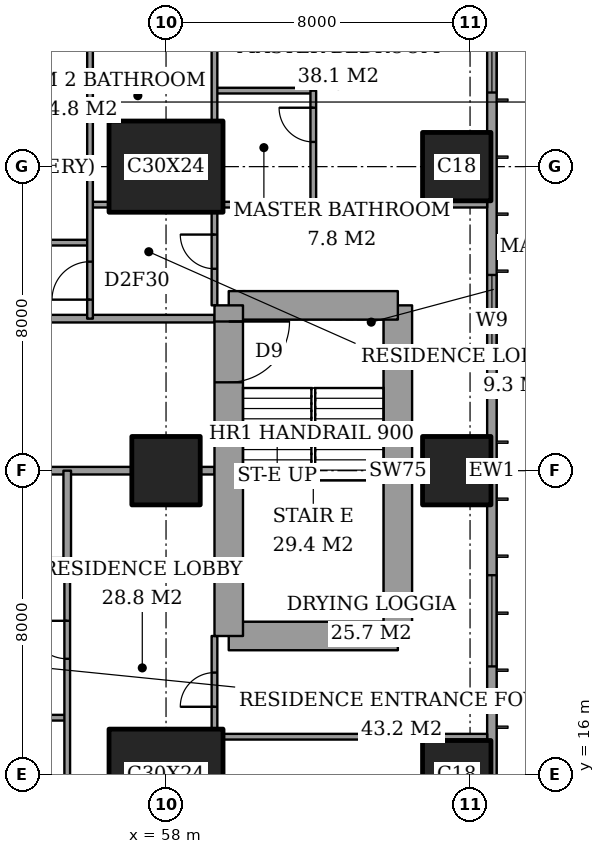
"""IFC4 building model, lengths in metres.
Left out: names, types, materials, properties, quantities, classifications, styles, units other than length and angle.
Written with IfcOpenShell. Run it as: python <this file> out.ifc"""

import sys

from ifc_helpers import new_model, si_unit, direction, frame, frame_2d, origin, origin_2d, place, context, subcontext, project, spatial, rectangle, extrude, element, fill, save


model = new_model("IFC4")
c1 = context("Model", 3, precision=1e-05, world=origin(), true_north=direction((0.0, 1.0)))
c2 = subcontext(c1, "Body", "Model", "MODEL_VIEW")
j1 = project(units=[si_unit("LENGTHUNIT", "METRE"), si_unit("PLANEANGLEUNIT", "RADIAN")], contexts=[c1])
p1 = place(None, origin())
s1 = spatial("IfcSite", under=j1, at=p1, CompositionType="ELEMENT")
p2 = place(p1, origin())
s2 = spatial("IfcBuilding", under=s1, at=p2, CompositionType="ELEMENT")
p3 = place(p2, frame((0.0, 0.0, 221.8)))
s3 = spatial("IfcBuildingStorey", under=s2, at=p3, CompositionType="ELEMENT", Elevation=221.8)
p4 = place(p3, frame((58.0, 16.0, 0.0), z_axis=(0.0, 0.0, 1.0), x_axis=(1.0, 0.0, 0.0)))
e1 = element("IfcColumn", 1, at=p4, inside=s3, PredefinedType="COLUMN", context=c2, shape_type="SweptSolid", body=[
    extrude(rectangle(XDim=3.0, YDim=2.4, at=origin_2d()), origin(), (0.0, 0.0, 1.0), 3.6),
])
p5 = place(p3, frame((58.0, 24.0, 0.0), z_axis=(0.0, 0.0, 1.0), x_axis=(1.0, 0.0, 0.0)))
e2 = element("IfcColumn", 2, at=p5, inside=s3, PredefinedType="COLUMN", context=c2, shape_type="SweptSolid", body=[
    extrude(rectangle(XDim=1.8, YDim=1.8, at=origin_2d()), origin(), (0.0, 0.0, 1.0), 3.6),
])
p6 = place(p3, frame((58.0, 32.0, 0.0), z_axis=(0.0, 0.0, 1.0), x_axis=(1.0, 0.0, 0.0)))
e3 = element("IfcColumn", 3, at=p6, inside=s3, PredefinedType="COLUMN", context=c2, shape_type="SweptSolid", body=[
    extrude(rectangle(XDim=3.0, YDim=2.4, at=origin_2d()), origin(), (0.0, 0.0, 1.0), 3.6),
])
for number, where, z_axis, x_axis in (
    (4, (65.65, 16.0, 0.0), (0.0, 0.0, 1.0), (1.0, 0.0, 0.0)),
    (5, (65.65, 24.0, 0.0), (0.0, 0.0, 1.0), (1.0, 0.0, 0.0)),
    (6, (65.65, 32.0, 0.0), (0.0, 0.0, 1.0), (1.0, 0.0, 0.0)),
):
    element("IfcColumn", number, at=place(p3, frame(where, z_axis=z_axis, x_axis=x_axis)), inside=s3, PredefinedType="COLUMN", context=c2, shape_type="SweptSolid", body=[
        extrude(rectangle(XDim=1.8, YDim=1.8, at=origin_2d()), origin(), (0.0, 0.0, 1.0), 3.6),
    ])
p7 = place(p3, frame((59.65, 19.65, 0.0), z_axis=(0.0, 0.0, 1.0), x_axis=(1.0, 0.0, 0.0)))
e7 = element("IfcWall", 7, at=p7, inside=s3, PredefinedType="SHEAR", context=c2, shape_type="SweptSolid", body=[
    extrude(rectangle(XDim=4.45, YDim=0.75, at=frame_2d((2.225, 0.0))), origin(), (0.0, 0.0, 1.0), 3.6),
])
p8 = place(p3, frame((64.1, 19.65, 0.0), z_axis=(0.0, 0.0, 1.0), x_axis=(0.0, 1.0, 0.0)))
e8 = element("IfcWall", 8, at=p8, inside=s3, PredefinedType="SHEAR", context=c2, shape_type="SweptSolid", body=[
    extrude(rectangle(XDim=8.7, YDim=0.75, at=frame_2d((4.35, 0.0))), origin(), (0.0, 0.0, 1.0), 3.6),
])
p9 = place(p3, frame((64.1, 28.35, 0.0), z_axis=(0.0, 0.0, 1.0), x_axis=(-1.0, 0.0, 0.0)))
e9 = element("IfcWall", 9, at=p9, inside=s3, PredefinedType="SHEAR", context=c2, shape_type="SweptSolid", body=[
    extrude(rectangle(XDim=4.45, YDim=0.75, at=frame_2d((2.225, 0.0))), origin(), (0.0, 0.0, 1.0), 3.6),
])
p10 = place(p3, frame((59.65, 28.35, 0.0), z_axis=(0.0, 0.0, 1.0), x_axis=(0.0, -1.0, 0.0)))
e10 = element("IfcWall", 10, at=p10, inside=s3, PredefinedType="SHEAR", context=c2, shape_type="SweptSolid", body=[
    extrude(rectangle(XDim=8.7, YDim=0.75, at=frame_2d((4.35, 0.0))), origin(), (0.0, 0.0, 1.0), 3.6),
])
p11 = place(p10, frame((0.425, 0.0, 0.0)))
e11 = element("IfcOpeningElement", 11, at=p11, cuts=e10, PredefinedType="OPENING", context=c2, shape_type="SweptSolid", body=[
    extrude(rectangle(XDim=1.6, YDim=2.1, at=frame_2d((0.8, 1.05))), frame((0.0, 0.385, 0.0), z_axis=(0.0, -1.0, 0.0), x_axis=(1.0, 0.0, 0.0)), (0.0, 0.0, 1.0), 0.77),
])
p12 = place(p3, frame((66.575, 3.175, 0.0), z_axis=(0.0, 0.0, 1.0), x_axis=(0.0, 1.0, 0.0)))
e12 = element("IfcWall", 12, at=p12, inside=s3, PredefinedType="SOLIDWALL", context=c2, shape_type="SweptSolid", body=[
    extrude(rectangle(XDim=41.65, YDim=0.25, at=frame_2d((20.825, 0.0))), origin(), (0.0, 0.0, 1.0), 3.6),
])
p13 = place(p12, frame((0.825, 0.0, 0.2)))
e13 = element("IfcOpeningElement", 13, at=p13, cuts=e12, PredefinedType="OPENING", context=c2, shape_type="SweptSolid", body=[
    extrude(rectangle(XDim=2.4, YDim=2.4, at=frame_2d((1.2, 1.2))), frame((0.0, 0.135, 0.0), z_axis=(0.0, -1.0, 0.0), x_axis=(1.0, 0.0, 0.0)), (0.0, 0.0, 1.0), 0.27),
])
p14 = place(p12, frame((6.225, 0.0, 0.2)))
e14 = element("IfcOpeningElement", 14, at=p14, cuts=e12, PredefinedType="OPENING", context=c2, shape_type="SweptSolid", body=[
    extrude(rectangle(XDim=1.2, YDim=2.4, at=frame_2d((0.6, 1.2))), frame((0.0, 0.135, 0.0), z_axis=(0.0, -1.0, 0.0), x_axis=(1.0, 0.0, 0.0)), (0.0, 0.0, 1.0), 0.27),
])
p15 = place(p12, frame((8.675, 0.0, 0.2)))
e15 = element("IfcOpeningElement", 15, at=p15, cuts=e12, PredefinedType="OPENING", context=c2, shape_type="SweptSolid", body=[
    extrude(rectangle(XDim=2.4, YDim=2.4, at=frame_2d((1.2, 1.2))), frame((0.0, 0.135, 0.0), z_axis=(0.0, -1.0, 0.0), x_axis=(1.0, 0.0, 0.0)), (0.0, 0.0, 1.0), 0.27),
])
p16 = place(p12, frame((15.675, 0.0, 0.2)))
e16 = element("IfcOpeningElement", 16, at=p16, cuts=e12, PredefinedType="OPENING", context=c2, shape_type="SweptSolid", body=[
    extrude(rectangle(XDim=2.4, YDim=2.4, at=frame_2d((1.2, 1.2))), frame((0.0, 0.135, 0.0), z_axis=(0.0, -1.0, 0.0), x_axis=(1.0, 0.0, 0.0)), (0.0, 0.0, 1.0), 0.27),
])
p17 = place(p12, frame((23.575, 0.0, 0.2)))
e17 = element("IfcOpeningElement", 17, at=p17, cuts=e12, PredefinedType="OPENING", context=c2, shape_type="SweptSolid", body=[
    extrude(rectangle(XDim=2.4, YDim=2.4, at=frame_2d((1.2, 1.2))), frame((0.0, 0.135, 0.0), z_axis=(0.0, -1.0, 0.0), x_axis=(1.0, 0.0, 0.0)), (0.0, 0.0, 1.0), 0.27),
])
p18 = place(p12, frame((30.775, 0.0, 0.2)))
e18 = element("IfcOpeningElement", 18, at=p18, cuts=e12, PredefinedType="OPENING", context=c2, shape_type="SweptSolid", body=[
    extrude(rectangle(XDim=2.4, YDim=2.4, at=frame_2d((1.2, 1.2))), frame((0.0, 0.135, 0.0), z_axis=(0.0, -1.0, 0.0), x_axis=(1.0, 0.0, 0.0)), (0.0, 0.0, 1.0), 0.27),
])
p19 = place(p12, frame((34.55, 0.0, 0.2)))
e19 = element("IfcOpeningElement", 19, at=p19, cuts=e12, PredefinedType="OPENING", context=c2, shape_type="SweptSolid", body=[
    extrude(rectangle(XDim=1.2, YDim=2.4, at=frame_2d((0.6, 1.2))), frame((0.0, 0.135, 0.0), z_axis=(0.0, -1.0, 0.0), x_axis=(1.0, 0.0, 0.0)), (0.0, 0.0, 1.0), 0.27),
])
p20 = place(p12, frame((38.425, 0.0, 0.2)))
e20 = element("IfcOpeningElement", 20, at=p20, cuts=e12, PredefinedType="OPENING", context=c2, shape_type="SweptSolid", body=[
    extrude(rectangle(XDim=2.4, YDim=2.4, at=frame_2d((1.2, 1.2))), frame((0.0, 0.135, 0.0), z_axis=(0.0, -1.0, 0.0), x_axis=(1.0, 0.0, 0.0)), (0.0, 0.0, 1.0), 0.27),
])
p21 = place(p3, frame((59.5, 17.0, 0.0), z_axis=(0.0, 0.0, 1.0), x_axis=(1.0, 0.0, 0.0)))
e21 = element("IfcWall", 21, at=p21, inside=s3, PredefinedType="PARTITIONING", context=c2, shape_type="SweptSolid", body=[
    extrude(rectangle(XDim=6.95, YDim=0.15, at=frame_2d((3.475, 0.0))), origin(), (0.0, 0.0, 1.0), 3.25),
])
p22 = place(p3, frame((51.6, 17.5, 0.0), z_axis=(0.0, 0.0, 1.0), x_axis=(1.0, 0.0, 0.0)))
e22 = element("IfcWall", 22, at=p22, inside=s3, PredefinedType="PARTITIONING", context=c2, shape_type="SweptSolid", body=[
    extrude(rectangle(XDim=3.8, YDim=0.15, at=frame_2d((1.9, 0.0))), origin(), (0.0, 0.0, 1.0), 3.25),
])
p23 = place(p22, frame((2.2, 0.0, 0.0)))
e23 = element("IfcOpeningElement", 23, at=p23, cuts=e22, PredefinedType="OPENING", context=c2, shape_type="SweptSolid", body=[
    extrude(rectangle(XDim=1.0, YDim=2.1, at=frame_2d((0.5, 1.05))), frame((0.0, 0.085, 0.0), z_axis=(0.0, -1.0, 0.0), x_axis=(1.0, 0.0, 0.0)), (0.0, 0.0, 1.0), 0.17),
])
p24 = place(p3, frame((51.2, 21.6, 0.0), z_axis=(0.0, 0.0, 1.0), x_axis=(1.0, 0.0, 0.0)))
e24 = element("IfcWall", 24, at=p24, inside=s3, PredefinedType="PARTITIONING", context=c2, shape_type="SweptSolid", body=[
    extrude(rectangle(XDim=4.2, YDim=0.2, at=frame_2d((2.1, 0.0))), origin(), (0.0, 0.0, 1.0), 3.25),
])
p25 = place(p24, frame((1.65, 0.0, 0.0)))
e25 = element("IfcOpeningElement", 25, at=p25, cuts=e24, PredefinedType="OPENING", context=c2, shape_type="SweptSolid", body=[
    extrude(rectangle(XDim=0.9, YDim=2.1, at=frame_2d((0.45, 1.05))), frame((0.0, 0.11, 0.0), z_axis=(0.0, -1.0, 0.0), x_axis=(1.0, 0.0, 0.0)), (0.0, 0.0, 1.0), 0.22),
])
p26 = place(p3, frame((50.9, 24.0, 0.0), z_axis=(0.0, 0.0, 1.0), x_axis=(1.0, 0.0, 0.0)))
e26 = element("IfcWall", 26, at=p26, inside=s3, PredefinedType="PARTITIONING", context=c2, shape_type="SweptSolid", body=[
    extrude(rectangle(XDim=6.2, YDim=0.2, at=frame_2d((3.1, 0.0))), origin(), (0.0, 0.0, 1.0), 3.25),
])
p27 = place(p3, frame((58.9, 24.0, 0.0), z_axis=(0.0, 0.0, 1.0), x_axis=(1.0, 0.0, 0.0)))
e27 = element("IfcWall", 27, at=p27, inside=s3, PredefinedType="PARTITIONING", context=c2, shape_type="SweptSolid", body=[
    extrude(rectangle(XDim=0.375, YDim=0.2, at=frame_2d((0.188, 0.0))), origin(), (0.0, 0.0, 1.0), 3.25),
])
p28 = place(p3, frame((42.0, 28.0, 0.0), z_axis=(0.0, 0.0, 1.0), x_axis=(1.0, 0.0, 0.0)))
e28 = element("IfcWall", 28, at=p28, inside=s3, PredefinedType="PARTITIONING", context=c2, shape_type="SweptSolid", body=[
    extrude(rectangle(XDim=17.275, YDim=0.2, at=frame_2d((8.637, 0.0))), origin(), (0.0, 0.0, 1.0), 3.25),
])
p29 = place(p28, frame((9.4, 0.0, 0.0)))
e29 = element("IfcOpeningElement", 29, at=p29, cuts=e28, PredefinedType="OPENING", context=c2, shape_type="SweptSolid", body=[
    extrude(rectangle(XDim=1.2, YDim=2.4, at=frame_2d((0.6, 1.2))), frame((0.0, 0.11, 0.0), z_axis=(0.0, -1.0, 0.0), x_axis=(1.0, 0.0, 0.0)), (0.0, 0.0, 1.0), 0.22),
])
p30 = place(p3, frame((51.6, 30.0, 0.0), z_axis=(0.0, 0.0, 1.0), x_axis=(1.0, 0.0, 0.0)))
e30 = element("IfcWall", 30, at=p30, inside=s3, PredefinedType="PARTITIONING", context=c2, shape_type="SweptSolid", body=[
    extrude(rectangle(XDim=4.4, YDim=0.15, at=frame_2d((2.2, 0.0))), origin(), (0.0, 0.0, 1.0), 3.25),
])
p31 = place(p30, frame((0.6, 0.0, 0.0)))
e31 = element("IfcOpeningElement", 31, at=p31, cuts=e30, PredefinedType="OPENING", context=c2, shape_type="SweptSolid", body=[
    extrude(rectangle(XDim=1.0, YDim=2.1, at=frame_2d((0.5, 1.05))), frame((0.0, 0.085, 0.0), z_axis=(0.0, -1.0, 0.0), x_axis=(1.0, 0.0, 0.0)), (0.0, 0.0, 1.0), 0.17),
])
p32 = place(p3, frame((56.0, 31.0, 0.0), z_axis=(0.0, 0.0, 1.0), x_axis=(1.0, 0.0, 0.0)))
e32 = element("IfcWall", 32, at=p32, inside=s3, PredefinedType="PARTITIONING", context=c2, shape_type="SweptSolid", body=[
    extrude(rectangle(XDim=0.5, YDim=0.15, at=frame_2d((0.25, 0.0))), origin(), (0.0, 0.0, 1.0), 3.25),
])
p33 = place(p3, frame((59.5, 31.0, 0.0), z_axis=(0.0, 0.0, 1.0), x_axis=(1.0, 0.0, 0.0)))
e33 = element("IfcWall", 33, at=p33, inside=s3, PredefinedType="PARTITIONING", context=c2, shape_type="SweptSolid", body=[
    extrude(rectangle(XDim=6.95, YDim=0.15, at=frame_2d((3.475, 0.0))), origin(), (0.0, 0.0, 1.0), 3.25),
])
p34 = place(p3, frame((59.275, 34.0, 0.0), z_axis=(0.0, 0.0, 1.0), x_axis=(1.0, 0.0, 0.0)))
e34 = element("IfcWall", 34, at=p34, inside=s3, PredefinedType="PARTITIONING", context=c2, shape_type="SweptSolid", body=[
    extrude(rectangle(XDim=2.6, YDim=0.15, at=frame_2d((1.3, 0.0))), origin(), (0.0, 0.0, 1.0), 3.25),
])
p35 = place(p3, frame((55.4, 21.6, 0.0), z_axis=(0.0, 0.0, 1.0), x_axis=(0.0, 1.0, 0.0)))
e35 = element("IfcWall", 35, at=p35, inside=s3, PredefinedType="PARTITIONING", context=c2, shape_type="SweptSolid", body=[
    extrude(rectangle(XDim=2.4, YDim=0.2, at=frame_2d((1.2, 0.0))), origin(), (0.0, 0.0, 1.0), 3.25),
])
p36 = place(p3, frame((55.4, 11.0, 0.0), z_axis=(0.0, 0.0, 1.0), x_axis=(0.0, 1.0, 0.0)))
e36 = element("IfcWall", 36, at=p36, inside=s3, PredefinedType="PARTITIONING", context=c2, shape_type="SweptSolid", body=[
    extrude(rectangle(XDim=10.6, YDim=0.15, at=frame_2d((5.3, 0.0))), origin(), (0.0, 0.0, 1.0), 3.25),
])
p37 = place(p36, frame((8.05, 0.0, 0.0)))
e37 = element("IfcOpeningElement", 37, at=p37, cuts=e36, PredefinedType="OPENING", context=c2, shape_type="SweptSolid", body=[
    extrude(rectangle(XDim=1.0, YDim=2.1, at=frame_2d((0.5, 1.05))), frame((0.0, 0.085, 0.0), z_axis=(0.0, -1.0, 0.0), x_axis=(1.0, 0.0, 0.0)), (0.0, 0.0, 1.0), 0.17),
])
p38 = place(p3, frame((56.0, 28.0, 0.0), z_axis=(0.0, 0.0, 1.0), x_axis=(0.0, 1.0, 0.0)))
e38 = element("IfcWall", 38, at=p38, inside=s3, PredefinedType="PARTITIONING", context=c2, shape_type="SweptSolid", body=[
    extrude(rectangle(XDim=9.4, YDim=0.15, at=frame_2d((4.7, 0.0))), origin(), (0.0, 0.0, 1.0), 3.25),
])
p39 = place(p38, frame((0.5, 0.0, 0.0)))
e39 = element("IfcOpeningElement", 39, at=p39, cuts=e38, PredefinedType="OPENING", context=c2, shape_type="SweptSolid", body=[
    extrude(rectangle(XDim=1.0, YDim=2.1, at=frame_2d((0.5, 1.05))), frame((0.0, 0.085, 0.0), z_axis=(0.0, -1.0, 0.0), x_axis=(1.0, 0.0, 0.0)), (0.0, 0.0, 1.0), 0.17),
])
p40 = place(p3, frame((59.275, 17.2, 0.0), z_axis=(0.0, 0.0, 1.0), x_axis=(0.0, 1.0, 0.0)))
e40 = element("IfcWall", 40, at=p40, inside=s3, PredefinedType="PARTITIONING", context=c2, shape_type="SweptSolid", body=[
    extrude(rectangle(XDim=2.45, YDim=0.15, at=frame_2d((1.225, 0.0))), origin(), (0.0, 0.0, 1.0), 3.25),
])
p41 = place(p40, frame((0.587, 0.0, 0.0)))
e41 = element("IfcOpeningElement", 41, at=p41, cuts=e40, PredefinedType="OPENING", context=c2, shape_type="SweptSolid", body=[
    extrude(rectangle(XDim=0.9, YDim=2.1, at=frame_2d((0.45, 1.05))), frame((0.0, 0.085, 0.0), z_axis=(0.0, -1.0, 0.0), x_axis=(1.0, 0.0, 0.0)), (0.0, 0.0, 1.0), 0.17),
])
p42 = place(p3, frame((59.275, 28.35, 0.0), z_axis=(0.0, 0.0, 1.0), x_axis=(0.0, 1.0, 0.0)))
e42 = element("IfcWall", 42, at=p42, inside=s3, PredefinedType="PARTITIONING", context=c2, shape_type="SweptSolid", body=[
    extrude(rectangle(XDim=2.45, YDim=0.15, at=frame_2d((1.225, 0.0))), origin(), (0.0, 0.0, 1.0), 3.25),
])
p43 = place(p42, frame((0.962, 0.0, 0.0)))
e43 = element("IfcOpeningElement", 43, at=p43, cuts=e42, PredefinedType="OPENING", context=c2, shape_type="SweptSolid", body=[
    extrude(rectangle(XDim=0.9, YDim=2.1, at=frame_2d((0.45, 1.05))), frame((0.0, 0.085, 0.0), z_axis=(0.0, -1.0, 0.0), x_axis=(1.0, 0.0, 0.0)), (0.0, 0.0, 1.0), 0.17),
])
p44 = place(p3, frame((59.275, 33.2, 0.0), z_axis=(0.0, 0.0, 1.0), x_axis=(0.0, 1.0, 0.0)))
e44 = element("IfcWall", 44, at=p44, inside=s3, PredefinedType="PARTITIONING", context=c2, shape_type="SweptSolid", body=[
    extrude(rectangle(XDim=4.2, YDim=0.15, at=frame_2d((2.1, 0.0))), origin(), (0.0, 0.0, 1.0), 3.25),
])
p45 = place(p3, frame((61.875, 31.0, 0.0), z_axis=(0.0, 0.0, 1.0), x_axis=(0.0, 1.0, 0.0)))
e45 = element("IfcWall", 45, at=p45, inside=s3, PredefinedType="PARTITIONING", context=c2, shape_type="SweptSolid", body=[
    extrude(rectangle(XDim=3.0, YDim=0.15, at=frame_2d((1.5, 0.0))), origin(), (0.0, 0.0, 1.0), 3.25),
])
p46 = place(p45, frame((1.65, 0.0, 0.0)))
e46 = element("IfcOpeningElement", 46, at=p46, cuts=e45, PredefinedType="OPENING", context=c2, shape_type="SweptSolid", body=[
    extrude(rectangle(XDim=0.9, YDim=2.1, at=frame_2d((0.45, 1.05))), frame((0.0, 0.085, 0.0), z_axis=(0.0, -1.0, 0.0), x_axis=(1.0, 0.0, 0.0)), (0.0, 0.0, 1.0), 0.17),
])
p47 = place(p16, origin())
e47 = element("IfcWindow", 47, at=p47, inside=s3, PartitioningType="SINGLE_PANEL", PredefinedType="WINDOW", context=c2, shape_type="SweptSolid", body=[
    extrude(rectangle(XDim=2.4, YDim=2.4, at=frame_2d((1.2, 1.2))), frame((0.0, 0.03, 0.0), z_axis=(0.0, -1.0, 0.0), x_axis=(1.0, 0.0, 0.0)), (0.0, 0.0, 1.0), 0.06),
])
fill(e16, e47)
p48 = place(p17, origin())
e48 = element("IfcWindow", 48, at=p48, inside=s3, PartitioningType="SINGLE_PANEL", PredefinedType="WINDOW", context=c2, shape_type="SweptSolid", body=[
    extrude(rectangle(XDim=2.4, YDim=2.4, at=frame_2d((1.2, 1.2))), frame((0.0, 0.03, 0.0), z_axis=(0.0, -1.0, 0.0), x_axis=(1.0, 0.0, 0.0)), (0.0, 0.0, 1.0), 0.06),
])
fill(e17, e48)
p49 = place(p18, origin())
e49 = element("IfcWindow", 49, at=p49, inside=s3, PartitioningType="SINGLE_PANEL", PredefinedType="WINDOW", context=c2, shape_type="SweptSolid", body=[
    extrude(rectangle(XDim=2.4, YDim=2.4, at=frame_2d((1.2, 1.2))), frame((0.0, 0.03, 0.0), z_axis=(0.0, -1.0, 0.0), x_axis=(1.0, 0.0, 0.0)), (0.0, 0.0, 1.0), 0.06),
])
fill(e18, e49)
p50 = place(p41, origin())
e50 = element("IfcDoor", 50, at=p50, inside=s3, OperationType="SINGLE_SWING_RIGHT", PredefinedType="DOOR", context=c2, shape_type="SweptSolid", body=[
    extrude(rectangle(XDim=0.9, YDim=2.1, at=frame_2d((0.45, 1.05))), frame((0.0, 0.025, 0.0), z_axis=(0.0, -1.0, 0.0), x_axis=(1.0, 0.0, 0.0)), (0.0, 0.0, 1.0), 0.05),
])
fill(e41, e50)
p51 = place(p37, origin())
e51 = element("IfcDoor", 51, at=p51, inside=s3, OperationType="SINGLE_SWING_LEFT", PredefinedType="DOOR", context=c2, shape_type="SweptSolid", body=[
    extrude(rectangle(XDim=1.0, YDim=2.1, at=frame_2d((0.5, 1.05))), frame((0.0, 0.025, 0.0), z_axis=(0.0, -1.0, 0.0), x_axis=(1.0, 0.0, 0.0)), (0.0, 0.0, 1.0), 0.05),
])
fill(e37, e51)
p52 = place(p46, origin())
e52 = element("IfcDoor", 52, at=p52, inside=s3, OperationType="SINGLE_SWING_LEFT", PredefinedType="DOOR", context=c2, shape_type="SweptSolid", body=[
    extrude(rectangle(XDim=0.9, YDim=2.1, at=frame_2d((0.45, 1.05))), frame((0.0, 0.025, 0.0), z_axis=(0.0, -1.0, 0.0), x_axis=(1.0, 0.0, 0.0)), (0.0, 0.0, 1.0), 0.05),
])
fill(e46, e52)
p53 = place(p43, origin())
e53 = element("IfcDoor", 53, at=p53, inside=s3, OperationType="SINGLE_SWING_LEFT", PredefinedType="DOOR", context=c2, shape_type="SweptSolid", body=[
    extrude(rectangle(XDim=0.9, YDim=2.1, at=frame_2d((0.45, 1.05))), frame((0.0, 0.025, 0.0), z_axis=(0.0, -1.0, 0.0), x_axis=(1.0, 0.0, 0.0)), (0.0, 0.0, 1.0), 0.05),
])
fill(e43, e53)
p54 = place(p39, origin())
e54 = element("IfcDoor", 54, at=p54, inside=s3, OperationType="SINGLE_SWING_RIGHT", PredefinedType="DOOR", context=c2, shape_type="SweptSolid", body=[
    extrude(rectangle(XDim=1.0, YDim=2.1, at=frame_2d((0.5, 1.05))), frame((0.0, 0.025, 0.0), z_axis=(0.0, -1.0, 0.0), x_axis=(1.0, 0.0, 0.0)), (0.0, 0.0, 1.0), 0.05),
])
fill(e39, e54)
p55 = place(p11, origin())
e55 = element("IfcDoor", 55, at=p55, inside=s3, OperationType="DOUBLE_DOOR_SINGLE_SWING", PredefinedType="DOOR", context=c2, shape_type="SweptSolid", body=[
    extrude(rectangle(XDim=1.6, YDim=2.1, at=frame_2d((0.8, 1.05))), frame((0.0, 0.025, 0.0), z_axis=(0.0, -1.0, 0.0), x_axis=(1.0, 0.0, 0.0)), (0.0, 0.0, 1.0), 0.05),
])
fill(e11, e55)
save(model, sys.argv[1])
